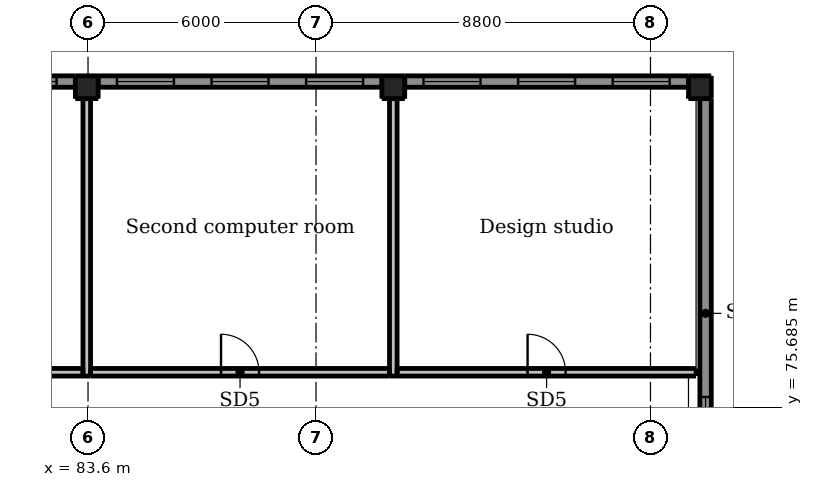
"""IFC4 building model, lengths in metres.
Left out: names, types, materials, properties, quantities, classifications, styles, units other than length and angle.
Written with IfcOpenShell. Run it as: python <this file> out.ifc"""

import sys

from ifc_helpers import new_model, si_unit, direction, frame, frame_2d, origin, origin_2d, place, context, subcontext, project, spatial, rectangle, extrude, element, fill, save


model = new_model("IFC4")
c1 = context("Model", 3, precision=1e-05, world=origin(), true_north=direction((0.0, 1.0)))
c2 = subcontext(c1, "Body", "Model", "MODEL_VIEW")
j1 = project(units=[si_unit("LENGTHUNIT", "METRE"), si_unit("PLANEANGLEUNIT", "RADIAN")], contexts=[c1])
p1 = place(None, origin())
s1 = spatial("IfcSite", under=j1, at=p1, CompositionType="ELEMENT")
p2 = place(p1, origin())
s2 = spatial("IfcBuilding", under=s1, at=p2, CompositionType="ELEMENT")
p3 = place(p2, frame((0.0, 0.0, 10.0)))
s3 = spatial("IfcBuildingStorey", under=s2, at=p3, CompositionType="ELEMENT", Elevation=10.0)
for number, where, z_axis, x_axis in (
    (1, (83.567, 84.1, -0.3), (0.0, 0.0, 1.0), (1.0, 0.0, 0.0)),
    (2, (91.633, 84.1, -0.3), (0.0, 0.0, 1.0), (1.0, 0.0, 0.0)),
    (3, (99.7, 84.1, -0.3), (0.0, 0.0, 1.0), (1.0, 0.0, 0.0)),
):
    element("IfcColumn", number, at=place(p3, frame(where, z_axis=z_axis, x_axis=x_axis)), inside=s3, PredefinedType="COLUMN", context=c2, shape_type="SweptSolid", body=[
        extrude(rectangle(XDim=0.6, YDim=0.6, at=origin_2d()), origin(), (0.0, 0.0, 1.0), 4.5),
    ])
p4 = place(p3, frame((75.8, 84.25, 0.0), z_axis=(0.0, 0.0, 1.0), x_axis=(1.0, 0.0, 0.0)))
e4 = element("IfcWall", 4, at=p4, inside=s3, PredefinedType="SOLIDWALL", context=c2, shape_type="SweptSolid", body=[
    extrude(rectangle(XDim=7.467, YDim=0.3, at=frame_2d((3.733, 0.0))), origin(), (0.0, 0.0, 1.0), 3.3),
])
p5 = place(p4, frame((0.494, 0.0, 0.9)))
e5 = element("IfcOpeningElement", 5, at=p5, cuts=e4, PredefinedType="OPENING", context=c2, shape_type="SweptSolid", body=[
    extrude(rectangle(XDim=1.5, YDim=1.5, at=frame_2d((0.75, 0.75))), frame((0.0, 0.16, 0.0), z_axis=(0.0, -1.0, 0.0), x_axis=(1.0, 0.0, 0.0)), (0.0, 0.0, 1.0), 0.32),
])
p6 = place(p4, frame((2.983, 0.0, 0.9)))
e6 = element("IfcOpeningElement", 6, at=p6, cuts=e4, PredefinedType="OPENING", context=c2, shape_type="SweptSolid", body=[
    extrude(rectangle(XDim=1.5, YDim=1.5, at=frame_2d((0.75, 0.75))), frame((0.0, 0.16, 0.0), z_axis=(0.0, -1.0, 0.0), x_axis=(1.0, 0.0, 0.0)), (0.0, 0.0, 1.0), 0.32),
])
p7 = place(p4, frame((5.472, 0.0, 0.9)))
e7 = element("IfcOpeningElement", 7, at=p7, cuts=e4, PredefinedType="OPENING", context=c2, shape_type="SweptSolid", body=[
    extrude(rectangle(XDim=1.5, YDim=1.5, at=frame_2d((0.75, 0.75))), frame((0.0, 0.16, 0.0), z_axis=(0.0, -1.0, 0.0), x_axis=(1.0, 0.0, 0.0)), (0.0, 0.0, 1.0), 0.32),
])
p8 = place(p3, frame((83.867, 84.25, 0.0), z_axis=(0.0, 0.0, 1.0), x_axis=(1.0, 0.0, 0.0)))
e8 = element("IfcWall", 8, at=p8, inside=s3, PredefinedType="SOLIDWALL", context=c2, shape_type="SweptSolid", body=[
    extrude(rectangle(XDim=7.466, YDim=0.3, at=frame_2d((3.733, 0.0))), origin(), (0.0, 0.0, 1.0), 3.3),
])
p9 = place(p8, frame((0.494, 0.0, 0.9)))
e9 = element("IfcOpeningElement", 9, at=p9, cuts=e8, PredefinedType="OPENING", context=c2, shape_type="SweptSolid", body=[
    extrude(rectangle(XDim=1.5, YDim=1.5, at=frame_2d((0.75, 0.75))), frame((0.0, 0.16, 0.0), z_axis=(0.0, -1.0, 0.0), x_axis=(1.0, 0.0, 0.0)), (0.0, 0.0, 1.0), 0.32),
])
p10 = place(p8, frame((2.983, 0.0, 0.9)))
e10 = element("IfcOpeningElement", 10, at=p10, cuts=e8, PredefinedType="OPENING", context=c2, shape_type="SweptSolid", body=[
    extrude(rectangle(XDim=1.5, YDim=1.5, at=frame_2d((0.75, 0.75))), frame((0.0, 0.16, 0.0), z_axis=(0.0, -1.0, 0.0), x_axis=(1.0, 0.0, 0.0)), (0.0, 0.0, 1.0), 0.32),
])
p11 = place(p8, frame((5.472, 0.0, 0.9)))
e11 = element("IfcOpeningElement", 11, at=p11, cuts=e8, PredefinedType="OPENING", context=c2, shape_type="SweptSolid", body=[
    extrude(rectangle(XDim=1.5, YDim=1.5, at=frame_2d((0.75, 0.75))), frame((0.0, 0.16, 0.0), z_axis=(0.0, -1.0, 0.0), x_axis=(1.0, 0.0, 0.0)), (0.0, 0.0, 1.0), 0.32),
])
p12 = place(p3, frame((91.933, 84.25, 0.0), z_axis=(0.0, 0.0, 1.0), x_axis=(1.0, 0.0, 0.0)))
e12 = element("IfcWall", 12, at=p12, inside=s3, PredefinedType="SOLIDWALL", context=c2, shape_type="SweptSolid", body=[
    extrude(rectangle(XDim=7.467, YDim=0.3, at=frame_2d((3.733, 0.0))), origin(), (0.0, 0.0, 1.0), 3.3),
])
p13 = place(p12, frame((0.494, 0.0, 0.9)))
e13 = element("IfcOpeningElement", 13, at=p13, cuts=e12, PredefinedType="OPENING", context=c2, shape_type="SweptSolid", body=[
    extrude(rectangle(XDim=1.5, YDim=1.5, at=frame_2d((0.75, 0.75))), frame((0.0, 0.16, 0.0), z_axis=(0.0, -1.0, 0.0), x_axis=(1.0, 0.0, 0.0)), (0.0, 0.0, 1.0), 0.32),
])
p14 = place(p12, frame((2.983, 0.0, 0.9)))
e14 = element("IfcOpeningElement", 14, at=p14, cuts=e12, PredefinedType="OPENING", context=c2, shape_type="SweptSolid", body=[
    extrude(rectangle(XDim=1.5, YDim=1.5, at=frame_2d((0.75, 0.75))), frame((0.0, 0.16, 0.0), z_axis=(0.0, -1.0, 0.0), x_axis=(1.0, 0.0, 0.0)), (0.0, 0.0, 1.0), 0.32),
])
p15 = place(p12, frame((5.472, 0.0, 0.9)))
e15 = element("IfcOpeningElement", 15, at=p15, cuts=e12, PredefinedType="OPENING", context=c2, shape_type="SweptSolid", body=[
    extrude(rectangle(XDim=1.5, YDim=1.5, at=frame_2d((0.75, 0.75))), frame((0.0, 0.16, 0.0), z_axis=(0.0, -1.0, 0.0), x_axis=(1.0, 0.0, 0.0)), (0.0, 0.0, 1.0), 0.32),
])
p16 = place(p3, frame((99.85, 72.5, 0.0), z_axis=(0.0, 0.0, 1.0), x_axis=(0.0, 1.0, 0.0)))
e16 = element("IfcWall", 16, at=p16, inside=s3, PredefinedType="SOLIDWALL", context=c2, shape_type="SweptSolid", body=[
    extrude(rectangle(XDim=11.3, YDim=0.3, at=frame_2d((5.65, 0.0))), origin(), (0.0, 0.0, 1.0), 3.1),
])
p17 = place(p16, frame((1.95, 0.0, 0.9)))
e17 = element("IfcOpeningElement", 17, at=p17, cuts=e16, PredefinedType="OPENING", context=c2, shape_type="SweptSolid", body=[
    extrude(rectangle(XDim=1.5, YDim=1.5, at=frame_2d((0.75, 0.75))), frame((0.0, 0.16, 0.0), z_axis=(0.0, -1.0, 0.0), x_axis=(1.0, 0.0, 0.0)), (0.0, 0.0, 1.0), 0.32),
])
p18 = place(p3, frame((75.6, 76.6, 0.0), z_axis=(0.0, 0.0, 1.0), x_axis=(1.0, 0.0, 0.0)))
e18 = element("IfcWall", 18, at=p18, inside=s3, PredefinedType="PARTITIONING", context=c2, shape_type="SweptSolid", body=[
    extrude(rectangle(XDim=7.867, YDim=0.2, at=frame_2d((3.934, 0.0))), origin(), (0.0, 0.0, 1.0), 3.1),
])
p19 = place(p18, frame((3.434, 0.0, 0.0)))
e19 = element("IfcOpeningElement", 19, at=p19, cuts=e18, PredefinedType="OPENING", context=c2, shape_type="SweptSolid", body=[
    extrude(rectangle(XDim=1.0, YDim=2.1, at=frame_2d((0.5, 1.05))), frame((0.0, 0.11, 0.0), z_axis=(0.0, -1.0, 0.0), x_axis=(1.0, 0.0, 0.0)), (0.0, 0.0, 1.0), 0.22),
])
p20 = place(p3, frame((83.667, 76.6, 0.0), z_axis=(0.0, 0.0, 1.0), x_axis=(1.0, 0.0, 0.0)))
e20 = element("IfcWall", 20, at=p20, inside=s3, PredefinedType="PARTITIONING", context=c2, shape_type="SweptSolid", body=[
    extrude(rectangle(XDim=7.866, YDim=0.2, at=frame_2d((3.933, 0.0))), origin(), (0.0, 0.0, 1.0), 3.1),
])
p21 = place(p20, frame((3.433, 0.0, 0.0)))
e21 = element("IfcOpeningElement", 21, at=p21, cuts=e20, PredefinedType="OPENING", context=c2, shape_type="SweptSolid", body=[
    extrude(rectangle(XDim=1.0, YDim=2.1, at=frame_2d((0.5, 1.05))), frame((0.0, 0.11, 0.0), z_axis=(0.0, -1.0, 0.0), x_axis=(1.0, 0.0, 0.0)), (0.0, 0.0, 1.0), 0.22),
])
p22 = place(p3, frame((91.733, 76.6, 0.0), z_axis=(0.0, 0.0, 1.0), x_axis=(1.0, 0.0, 0.0)))
e22 = element("IfcWall", 22, at=p22, inside=s3, PredefinedType="PARTITIONING", context=c2, shape_type="SweptSolid", body=[
    extrude(rectangle(XDim=7.867, YDim=0.2, at=frame_2d((3.934, 0.0))), origin(), (0.0, 0.0, 1.0), 3.1),
])
p23 = place(p22, frame((3.434, 0.0, 0.0)))
e23 = element("IfcOpeningElement", 23, at=p23, cuts=e22, PredefinedType="OPENING", context=c2, shape_type="SweptSolid", body=[
    extrude(rectangle(XDim=1.0, YDim=2.1, at=frame_2d((0.5, 1.05))), frame((0.0, 0.11, 0.0), z_axis=(0.0, -1.0, 0.0), x_axis=(1.0, 0.0, 0.0)), (0.0, 0.0, 1.0), 0.22),
])
for number, where, z_axis, x_axis in (
    (24, (83.567, 76.5, 0.0), (0.0, 0.0, 1.0), (0.0, 1.0, 0.0)),
    (25, (91.633, 76.5, 0.0), (0.0, 0.0, 1.0), (0.0, 1.0, 0.0)),
):
    element("IfcWall", number, at=place(p3, frame(where, z_axis=z_axis, x_axis=x_axis)), inside=s3, PredefinedType="PARTITIONING", context=c2, shape_type="SweptSolid", body=[
        extrude(rectangle(XDim=7.3, YDim=0.2, at=frame_2d((3.65, 0.0))), origin(), (0.0, 0.0, 1.0), 3.1),
    ])
p24 = place(p7, origin())
e26 = element("IfcWindow", 26, at=p24, inside=s3, PartitioningType="DOUBLE_PANEL_HORIZONTAL", PredefinedType="WINDOW", context=c2, shape_type="SweptSolid", body=[
    extrude(rectangle(XDim=1.5, YDim=1.5, at=frame_2d((0.75, 0.75))), frame((0.0, 0.03, 0.0), z_axis=(0.0, -1.0, 0.0), x_axis=(1.0, 0.0, 0.0)), (0.0, 0.0, 1.0), 0.06),
])
fill(e7, e26)
p25 = place(p9, origin())
e27 = element("IfcWindow", 27, at=p25, inside=s3, PartitioningType="DOUBLE_PANEL_HORIZONTAL", PredefinedType="WINDOW", context=c2, shape_type="SweptSolid", body=[
    extrude(rectangle(XDim=1.5, YDim=1.5, at=frame_2d((0.75, 0.75))), frame((0.0, 0.03, 0.0), z_axis=(0.0, -1.0, 0.0), x_axis=(1.0, 0.0, 0.0)), (0.0, 0.0, 1.0), 0.06),
])
fill(e9, e27)
p26 = place(p10, origin())
e28 = element("IfcWindow", 28, at=p26, inside=s3, PartitioningType="DOUBLE_PANEL_HORIZONTAL", PredefinedType="WINDOW", context=c2, shape_type="SweptSolid", body=[
    extrude(rectangle(XDim=1.5, YDim=1.5, at=frame_2d((0.75, 0.75))), frame((0.0, 0.03, 0.0), z_axis=(0.0, -1.0, 0.0), x_axis=(1.0, 0.0, 0.0)), (0.0, 0.0, 1.0), 0.06),
])
fill(e10, e28)
p27 = place(p11, origin())
e29 = element("IfcWindow", 29, at=p27, inside=s3, PartitioningType="DOUBLE_PANEL_HORIZONTAL", PredefinedType="WINDOW", context=c2, shape_type="SweptSolid", body=[
    extrude(rectangle(XDim=1.5, YDim=1.5, at=frame_2d((0.75, 0.75))), frame((0.0, 0.03, 0.0), z_axis=(0.0, -1.0, 0.0), x_axis=(1.0, 0.0, 0.0)), (0.0, 0.0, 1.0), 0.06),
])
fill(e11, e29)
p28 = place(p13, origin())
e30 = element("IfcWindow", 30, at=p28, inside=s3, PartitioningType="DOUBLE_PANEL_HORIZONTAL", PredefinedType="WINDOW", context=c2, shape_type="SweptSolid", body=[
    extrude(rectangle(XDim=1.5, YDim=1.5, at=frame_2d((0.75, 0.75))), frame((0.0, 0.03, 0.0), z_axis=(0.0, -1.0, 0.0), x_axis=(1.0, 0.0, 0.0)), (0.0, 0.0, 1.0), 0.06),
])
fill(e13, e30)
p29 = place(p14, origin())
e31 = element("IfcWindow", 31, at=p29, inside=s3, PartitioningType="DOUBLE_PANEL_HORIZONTAL", PredefinedType="WINDOW", context=c2, shape_type="SweptSolid", body=[
    extrude(rectangle(XDim=1.5, YDim=1.5, at=frame_2d((0.75, 0.75))), frame((0.0, 0.03, 0.0), z_axis=(0.0, -1.0, 0.0), x_axis=(1.0, 0.0, 0.0)), (0.0, 0.0, 1.0), 0.06),
])
fill(e14, e31)
p30 = place(p15, origin())
e32 = element("IfcWindow", 32, at=p30, inside=s3, PartitioningType="DOUBLE_PANEL_HORIZONTAL", PredefinedType="WINDOW", context=c2, shape_type="SweptSolid", body=[
    extrude(rectangle(XDim=1.5, YDim=1.5, at=frame_2d((0.75, 0.75))), frame((0.0, 0.03, 0.0), z_axis=(0.0, -1.0, 0.0), x_axis=(1.0, 0.0, 0.0)), (0.0, 0.0, 1.0), 0.06),
])
fill(e15, e32)
p31 = place(p17, origin())
e33 = element("IfcWindow", 33, at=p31, inside=s3, PartitioningType="DOUBLE_PANEL_HORIZONTAL", PredefinedType="WINDOW", context=c2, shape_type="SweptSolid", body=[
    extrude(rectangle(XDim=1.5, YDim=1.5, at=frame_2d((0.75, 0.75))), frame((0.0, 0.03, 0.0), z_axis=(0.0, -1.0, 0.0), x_axis=(1.0, 0.0, 0.0)), (0.0, 0.0, 1.0), 0.06),
])
fill(e17, e33)
p32 = place(p21, origin())
e34 = element("IfcDoor", 34, at=p32, inside=s3, OperationType="SINGLE_SWING_LEFT", PredefinedType="DOOR", context=c2, shape_type="SweptSolid", body=[
    extrude(rectangle(XDim=1.0, YDim=2.1, at=frame_2d((0.5, 1.05))), frame((0.0, 0.025, 0.0), z_axis=(0.0, -1.0, 0.0), x_axis=(1.0, 0.0, 0.0)), (0.0, 0.0, 1.0), 0.05),
])
fill(e21, e34)
p33 = place(p23, origin())
e35 = element("IfcDoor", 35, at=p33, inside=s3, OperationType="SINGLE_SWING_LEFT", PredefinedType="DOOR", context=c2, shape_type="SweptSolid", body=[
    extrude(rectangle(XDim=1.0, YDim=2.1, at=frame_2d((0.5, 1.05))), frame((0.0, 0.025, 0.0), z_axis=(0.0, -1.0, 0.0), x_axis=(1.0, 0.0, 0.0)), (0.0, 0.0, 1.0), 0.05),
])
fill(e23, e35)
save(model, sys.argv[1])
